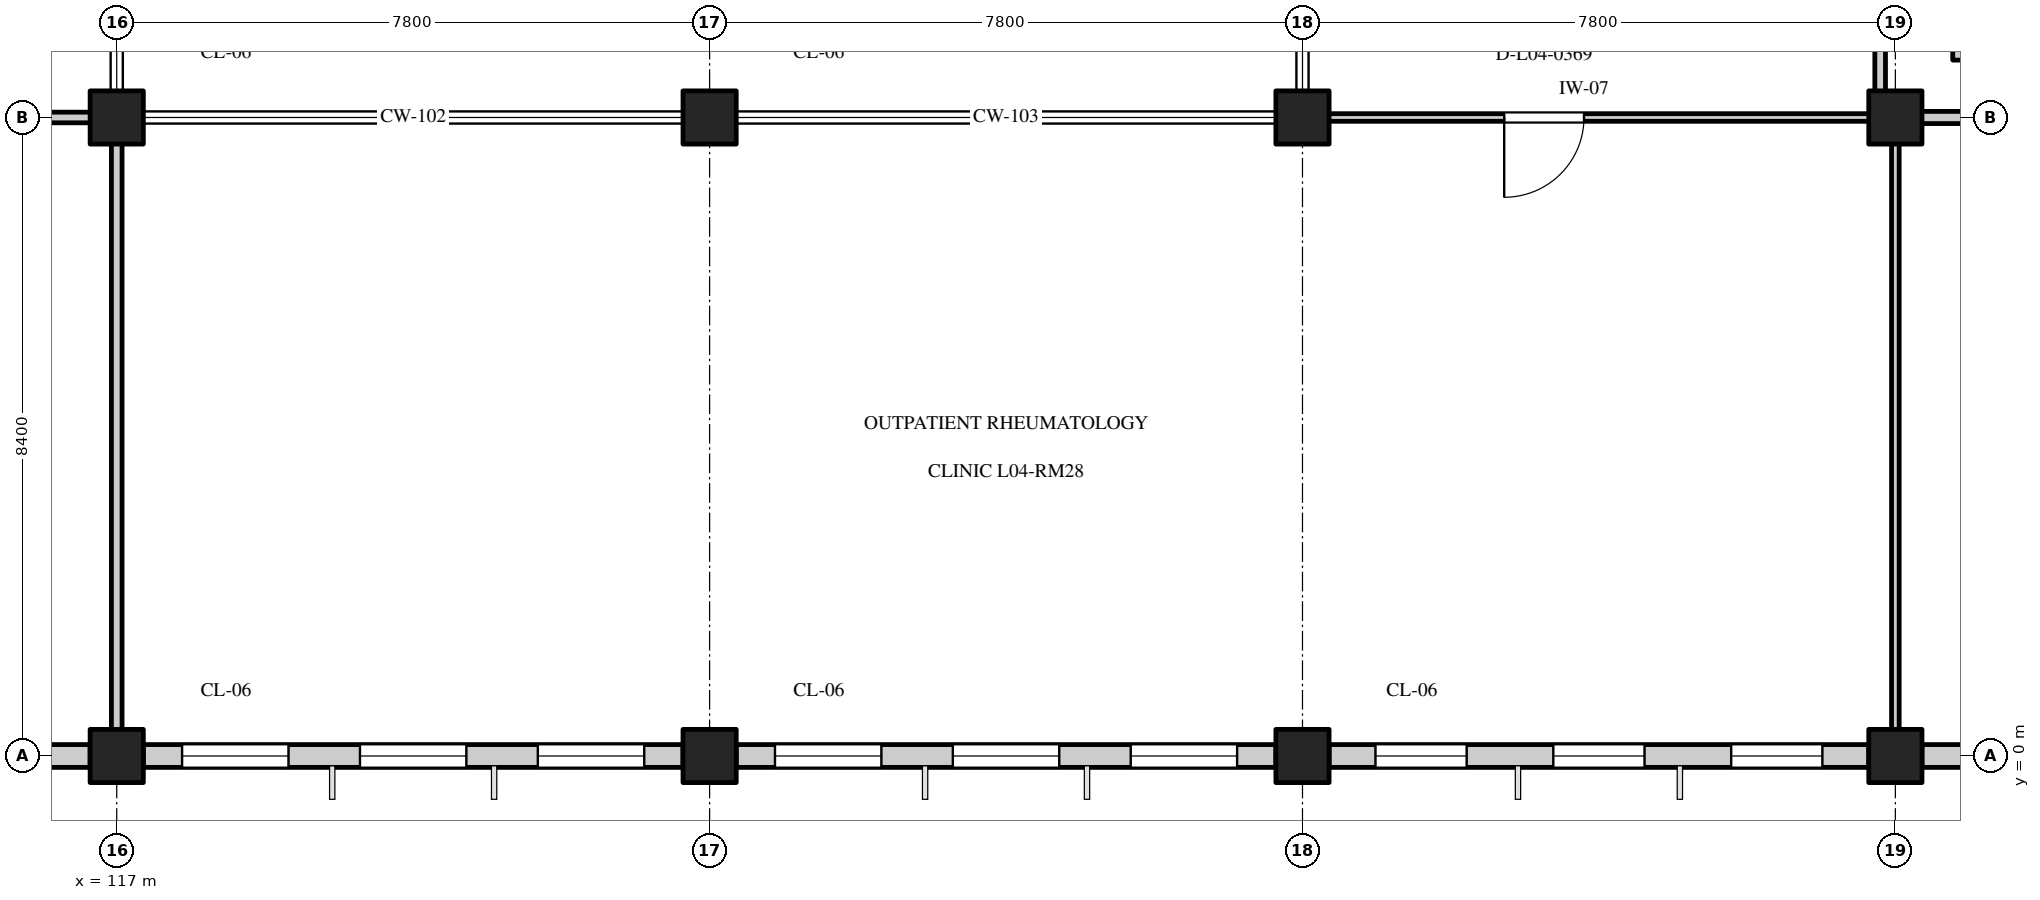
"""IFC4 building model, lengths in metres.
Left out: names, types, materials, properties, quantities, classifications, styles, units other than length and angle.
Written with IfcOpenShell. Run it as: python <this file> out.ifc"""

import sys

from ifc_helpers import new_model, si_unit, direction, frame, frame_2d, origin, origin_2d, place, context, subcontext, project, spatial, rectangle, extrude, element, fill, save


model = new_model("IFC4")
c1 = context("Model", 3, precision=1e-05, world=origin(), true_north=direction((0.0, 1.0)))
c2 = subcontext(c1, "Body", "Model", "MODEL_VIEW")
j1 = project(units=[si_unit("LENGTHUNIT", "METRE"), si_unit("PLANEANGLEUNIT", "RADIAN")], contexts=[c1])
p1 = place(None, origin())
s1 = spatial("IfcSite", under=j1, at=p1, CompositionType="ELEMENT")
p2 = place(p1, origin())
s2 = spatial("IfcBuilding", under=s1, at=p2, CompositionType="ELEMENT")
p3 = place(p2, frame((0.0, 0.0, 18.0)))
s3 = spatial("IfcBuildingStorey", under=s2, at=p3, CompositionType="ELEMENT", Elevation=18.0)
for number, where, z_axis, x_axis in (
    (1, (117.0, 0.0, 0.0), (0.0, 0.0, 1.0), (1.0, 0.0, 0.0)),
    (2, (117.0, 8.4, 0.0), (0.0, 0.0, 1.0), (1.0, 0.0, 0.0)),
    (3, (124.8, 0.0, 0.0), (0.0, 0.0, 1.0), (1.0, 0.0, 0.0)),
    (4, (124.8, 8.4, 0.0), (0.0, 0.0, 1.0), (1.0, 0.0, 0.0)),
    (5, (132.6, 0.0, 0.0), (0.0, 0.0, 1.0), (1.0, 0.0, 0.0)),
    (6, (132.6, 8.4, 0.0), (0.0, 0.0, 1.0), (1.0, 0.0, 0.0)),
    (7, (140.4, 0.0, 0.0), (0.0, 0.0, 1.0), (1.0, 0.0, 0.0)),
    (8, (140.4, 8.4, 0.0), (0.0, 0.0, 1.0), (1.0, 0.0, 0.0)),
):
    element("IfcColumn", number, at=place(p3, frame(where, z_axis=z_axis, x_axis=x_axis)), inside=s3, PredefinedType="COLUMN", context=c2, shape_type="SweptSolid", body=[
        extrude(rectangle(XDim=0.7, YDim=0.7, at=origin_2d()), origin(), (0.0, 0.0, 1.0), 4.2),
    ])
p4 = place(p3, frame((109.55, 0.0, 0.0), z_axis=(0.0, 0.0, 1.0), x_axis=(1.0, 0.0, 0.0)))
e9 = element("IfcWall", 9, at=p4, inside=s3, PredefinedType="STANDARD", context=c2, shape_type="SweptSolid", body=[
    extrude(rectangle(XDim=7.1, YDim=0.3, at=frame_2d((3.55, 0.0))), origin(), (0.0, 0.0, 1.0), 3.335),
])
p5 = place(p4, frame((0.61, 0.0, 0.8)))
e10 = element("IfcOpeningElement", 10, at=p5, cuts=e9, PredefinedType="OPENING", context=c2, shape_type="SweptSolid", body=[
    extrude(rectangle(XDim=1.2, YDim=1.4, at=frame_2d((0.6, 0.7))), frame((0.0, 0.162, 0.0), z_axis=(0.0, -1.0, 0.0), x_axis=(1.0, 0.0, 0.0)), (0.0, 0.0, 1.0), 0.324),
])
p6 = place(p4, frame((2.95, 0.0, 0.8)))
e11 = element("IfcOpeningElement", 11, at=p6, cuts=e9, PredefinedType="OPENING", context=c2, shape_type="SweptSolid", body=[
    extrude(rectangle(XDim=1.2, YDim=1.4, at=frame_2d((0.6, 0.7))), frame((0.0, 0.162, 0.0), z_axis=(0.0, -1.0, 0.0), x_axis=(1.0, 0.0, 0.0)), (0.0, 0.0, 1.0), 0.324),
])
p7 = place(p4, frame((5.29, 0.0, 0.8)))
e12 = element("IfcOpeningElement", 12, at=p7, cuts=e9, PredefinedType="OPENING", context=c2, shape_type="SweptSolid", body=[
    extrude(rectangle(XDim=1.2, YDim=1.4, at=frame_2d((0.6, 0.7))), frame((0.0, 0.162, 0.0), z_axis=(0.0, -1.0, 0.0), x_axis=(1.0, 0.0, 0.0)), (0.0, 0.0, 1.0), 0.324),
])
p8 = place(p3, frame((117.35, 0.0, 0.0), z_axis=(0.0, 0.0, 1.0), x_axis=(1.0, 0.0, 0.0)))
e13 = element("IfcWall", 13, at=p8, inside=s3, PredefinedType="STANDARD", context=c2, shape_type="SweptSolid", body=[
    extrude(rectangle(XDim=7.1, YDim=0.3, at=frame_2d((3.55, 0.0))), origin(), (0.0, 0.0, 1.0), 3.335),
])
p9 = place(p8, frame((0.51, 0.0, 0.8)))
e14 = element("IfcOpeningElement", 14, at=p9, cuts=e13, PredefinedType="OPENING", context=c2, shape_type="SweptSolid", body=[
    extrude(rectangle(XDim=1.4, YDim=1.6, at=frame_2d((0.7, 0.8))), frame((0.0, 0.162, 0.0), z_axis=(0.0, -1.0, 0.0), x_axis=(1.0, 0.0, 0.0)), (0.0, 0.0, 1.0), 0.324),
])
p10 = place(p8, frame((2.85, 0.0, 0.8)))
e15 = element("IfcOpeningElement", 15, at=p10, cuts=e13, PredefinedType="OPENING", context=c2, shape_type="SweptSolid", body=[
    extrude(rectangle(XDim=1.4, YDim=1.6, at=frame_2d((0.7, 0.8))), frame((0.0, 0.162, 0.0), z_axis=(0.0, -1.0, 0.0), x_axis=(1.0, 0.0, 0.0)), (0.0, 0.0, 1.0), 0.324),
])
p11 = place(p8, frame((5.19, 0.0, 0.8)))
e16 = element("IfcOpeningElement", 16, at=p11, cuts=e13, PredefinedType="OPENING", context=c2, shape_type="SweptSolid", body=[
    extrude(rectangle(XDim=1.4, YDim=1.6, at=frame_2d((0.7, 0.8))), frame((0.0, 0.162, 0.0), z_axis=(0.0, -1.0, 0.0), x_axis=(1.0, 0.0, 0.0)), (0.0, 0.0, 1.0), 0.324),
])
p12 = place(p3, frame((125.15, 0.0, 0.0), z_axis=(0.0, 0.0, 1.0), x_axis=(1.0, 0.0, 0.0)))
e17 = element("IfcWall", 17, at=p12, inside=s3, PredefinedType="STANDARD", context=c2, shape_type="SweptSolid", body=[
    extrude(rectangle(XDim=7.1, YDim=0.3, at=frame_2d((3.55, 0.0))), origin(), (0.0, 0.0, 1.0), 3.335),
])
p13 = place(p12, frame((0.51, 0.0, 0.8)))
e18 = element("IfcOpeningElement", 18, at=p13, cuts=e17, PredefinedType="OPENING", context=c2, shape_type="SweptSolid", body=[
    extrude(rectangle(XDim=1.4, YDim=1.45, at=frame_2d((0.7, 0.725))), frame((0.0, 0.162, 0.0), z_axis=(0.0, -1.0, 0.0), x_axis=(1.0, 0.0, 0.0)), (0.0, 0.0, 1.0), 0.324),
])
p14 = place(p12, frame((2.85, 0.0, 0.8)))
e19 = element("IfcOpeningElement", 19, at=p14, cuts=e17, PredefinedType="OPENING", context=c2, shape_type="SweptSolid", body=[
    extrude(rectangle(XDim=1.4, YDim=1.45, at=frame_2d((0.7, 0.725))), frame((0.0, 0.162, 0.0), z_axis=(0.0, -1.0, 0.0), x_axis=(1.0, 0.0, 0.0)), (0.0, 0.0, 1.0), 0.324),
])
p15 = place(p12, frame((5.19, 0.0, 0.8)))
e20 = element("IfcOpeningElement", 20, at=p15, cuts=e17, PredefinedType="OPENING", context=c2, shape_type="SweptSolid", body=[
    extrude(rectangle(XDim=1.4, YDim=1.45, at=frame_2d((0.7, 0.725))), frame((0.0, 0.162, 0.0), z_axis=(0.0, -1.0, 0.0), x_axis=(1.0, 0.0, 0.0)), (0.0, 0.0, 1.0), 0.324),
])
p16 = place(p3, frame((132.95, 0.0, 0.0), z_axis=(0.0, 0.0, 1.0), x_axis=(1.0, 0.0, 0.0)))
e21 = element("IfcWall", 21, at=p16, inside=s3, PredefinedType="STANDARD", context=c2, shape_type="SweptSolid", body=[
    extrude(rectangle(XDim=7.1, YDim=0.3, at=frame_2d((3.55, 0.0))), origin(), (0.0, 0.0, 1.0), 3.335),
])
p17 = place(p16, frame((0.61, 0.0, 0.8)))
e22 = element("IfcOpeningElement", 22, at=p17, cuts=e21, PredefinedType="OPENING", context=c2, shape_type="SweptSolid", body=[
    extrude(rectangle(XDim=1.2, YDim=1.55, at=frame_2d((0.6, 0.775))), frame((0.0, 0.162, 0.0), z_axis=(0.0, -1.0, 0.0), x_axis=(1.0, 0.0, 0.0)), (0.0, 0.0, 1.0), 0.324),
])
p18 = place(p16, frame((2.95, 0.0, 0.8)))
e23 = element("IfcOpeningElement", 23, at=p18, cuts=e21, PredefinedType="OPENING", context=c2, shape_type="SweptSolid", body=[
    extrude(rectangle(XDim=1.2, YDim=1.55, at=frame_2d((0.6, 0.775))), frame((0.0, 0.162, 0.0), z_axis=(0.0, -1.0, 0.0), x_axis=(1.0, 0.0, 0.0)), (0.0, 0.0, 1.0), 0.324),
])
p19 = place(p16, frame((5.29, 0.0, 0.8)))
e24 = element("IfcOpeningElement", 24, at=p19, cuts=e21, PredefinedType="OPENING", context=c2, shape_type="SweptSolid", body=[
    extrude(rectangle(XDim=1.2, YDim=1.55, at=frame_2d((0.6, 0.775))), frame((0.0, 0.162, 0.0), z_axis=(0.0, -1.0, 0.0), x_axis=(1.0, 0.0, 0.0)), (0.0, 0.0, 1.0), 0.324),
])
p20 = place(p3, frame((140.75, 0.0, 0.0), z_axis=(0.0, 0.0, 1.0), x_axis=(1.0, 0.0, 0.0)))
e25 = element("IfcWall", 25, at=p20, inside=s3, PredefinedType="STANDARD", context=c2, shape_type="SweptSolid", body=[
    extrude(rectangle(XDim=7.075, YDim=0.3, at=frame_2d((3.538, 0.0))), origin(), (0.0, 0.0, 1.0), 3.335),
])
p21 = place(p20, frame((0.61, 0.0, 0.8)))
e26 = element("IfcOpeningElement", 26, at=p21, cuts=e25, PredefinedType="OPENING", context=c2, shape_type="SweptSolid", body=[
    extrude(rectangle(XDim=1.2, YDim=1.4, at=frame_2d((0.6, 0.7))), frame((0.0, 0.162, 0.0), z_axis=(0.0, -1.0, 0.0), x_axis=(1.0, 0.0, 0.0)), (0.0, 0.0, 1.0), 0.324),
])
p22 = place(p20, frame((2.95, 0.0, 0.8)))
e27 = element("IfcOpeningElement", 27, at=p22, cuts=e25, PredefinedType="OPENING", context=c2, shape_type="SweptSolid", body=[
    extrude(rectangle(XDim=1.2, YDim=1.4, at=frame_2d((0.6, 0.7))), frame((0.0, 0.162, 0.0), z_axis=(0.0, -1.0, 0.0), x_axis=(1.0, 0.0, 0.0)), (0.0, 0.0, 1.0), 0.324),
])
p23 = place(p20, frame((5.29, 0.0, 0.8)))
e28 = element("IfcOpeningElement", 28, at=p23, cuts=e25, PredefinedType="OPENING", context=c2, shape_type="SweptSolid", body=[
    extrude(rectangle(XDim=1.2, YDim=1.4, at=frame_2d((0.6, 0.7))), frame((0.0, 0.162, 0.0), z_axis=(0.0, -1.0, 0.0), x_axis=(1.0, 0.0, 0.0)), (0.0, 0.0, 1.0), 0.324),
])
p24 = place(p3, frame((141.275, 9.155, 0.0), z_axis=(0.0, 0.0, 1.0), x_axis=(0.0, 1.0, 0.0)))
e29 = element("IfcWall", 29, at=p24, inside=s3, PredefinedType="STANDARD", context=c2, shape_type="SweptSolid", body=[
    extrude(rectangle(XDim=2.695, YDim=0.24, at=frame_2d((1.348, 0.0))), origin(), (0.0, 0.0, 1.0), 3.885),
])
p25 = place(p3, frame((101.485, 8.4, 0.0), z_axis=(0.0, 0.0, 1.0), x_axis=(1.0, 0.0, 0.0)))
e30 = element("IfcWall", 30, at=p25, inside=s3, PredefinedType="PARTITIONING", context=c2, shape_type="SweptSolid", body=[
    extrude(rectangle(XDim=15.43, YDim=0.14, at=frame_2d((7.715, 0.0))), origin(), (0.0, 0.0, 1.0), 3.865),
])
p26 = place(p25, frame((2.679, 0.0, 0.0)))
e31 = element("IfcOpeningElement", 31, at=p26, cuts=e30, PredefinedType="OPENING", context=c2, shape_type="SweptSolid", body=[
    extrude(rectangle(XDim=1.05, YDim=2.1, at=frame_2d((0.525, 1.05))), frame((0.0, 0.082, 0.0), z_axis=(0.0, -1.0, 0.0), x_axis=(1.0, 0.0, 0.0)), (0.0, 0.0, 1.0), 0.164),
])
p27 = place(p3, frame((117.0, 0.085, 0.0), z_axis=(0.0, 0.0, 1.0), x_axis=(0.0, 1.0, 0.0)))
e32 = element("IfcWall", 32, at=p27, inside=s3, PredefinedType="PARTITIONING", context=c2, shape_type="SweptSolid", body=[
    extrude(rectangle(XDim=8.23, YDim=0.14, at=frame_2d((4.115, 0.0))), origin(), (0.0, 0.0, 1.0), 3.235),
])
p28 = place(p3, frame((124.49, 8.4, 0.0), z_axis=(0.0, 0.0, 1.0), x_axis=(1.0, 0.0, 0.0)))
e33 = element("IfcWall", 33, at=p28, inside=s3, PredefinedType="PARTITIONING", context=c2, shape_type="SweptSolid", body=[
    extrude(rectangle(XDim=0.62, YDim=0.1, at=frame_2d((0.31, 0.0))), origin(), (0.0, 0.0, 1.0), 3.865),
])
p29 = place(p3, frame((132.29, 8.4, 0.0), z_axis=(0.0, 0.0, 1.0), x_axis=(1.0, 0.0, 0.0)))
e34 = element("IfcWall", 34, at=p29, inside=s3, PredefinedType="PARTITIONING", context=c2, shape_type="SweptSolid", body=[
    extrude(rectangle(XDim=8.025, YDim=0.1, at=frame_2d((4.012, 0.0))), origin(), (0.0, 0.0, 1.0), 3.865),
])
p30 = place(p29, frame((2.964, 0.0, 0.0)))
e35 = element("IfcOpeningElement", 35, at=p30, cuts=e34, PredefinedType="OPENING", context=c2, shape_type="SweptSolid", body=[
    extrude(rectangle(XDim=1.05, YDim=2.1, at=frame_2d((0.525, 1.05))), frame((0.0, 0.062, 0.0), z_axis=(0.0, -1.0, 0.0), x_axis=(1.0, 0.0, 0.0)), (0.0, 0.0, 1.0), 0.124),
])
p31 = place(p3, frame((124.49, 0.0, 0.0), z_axis=(0.0, 0.0, 1.0), x_axis=(1.0, 0.0, 0.0)))
e36 = element("IfcWall", 36, at=p31, inside=s3, PredefinedType="PARTITIONING", context=c2, shape_type="SweptSolid", body=[
    extrude(rectangle(XDim=0.62, YDim=0.1, at=frame_2d((0.31, 0.0))), origin(), (0.0, 0.0, 1.0), 3.235),
])
p32 = place(p3, frame((132.29, 0.0, 0.0), z_axis=(0.0, 0.0, 1.0), x_axis=(1.0, 0.0, 0.0)))
e37 = element("IfcWall", 37, at=p32, inside=s3, PredefinedType="PARTITIONING", context=c2, shape_type="SweptSolid", body=[
    extrude(rectangle(XDim=0.62, YDim=0.1, at=frame_2d((0.31, 0.0))), origin(), (0.0, 0.0, 1.0), 3.235),
])
p33 = place(p3, frame((140.4, 0.085, 0.0), z_axis=(0.0, 0.0, 1.0), x_axis=(0.0, 1.0, 0.0)))
e38 = element("IfcWall", 38, at=p33, inside=s3, PredefinedType="PARTITIONING", context=c2, shape_type="SweptSolid", body=[
    extrude(rectangle(XDim=8.23, YDim=0.1, at=frame_2d((4.115, 0.0))), origin(), (0.0, 0.0, 1.0), 3.865),
])
p34 = place(p3, frame((140.2, 8.485, 0.0), z_axis=(0.0, 0.0, 1.0), x_axis=(0.0, 1.0, 0.0)))
e39 = element("IfcWall", 39, at=p34, inside=s3, PredefinedType="PARTITIONING", context=c2, shape_type="SweptSolid", body=[
    extrude(rectangle(XDim=16.63, YDim=0.14, at=frame_2d((8.315, 0.0))), origin(), (0.0, 0.0, 1.0), 3.865),
])
p35 = place(p3, frame((140.485, 8.4, 0.0), z_axis=(0.0, 0.0, 1.0), x_axis=(1.0, 0.0, 0.0)))
e40 = element("IfcWall", 40, at=p35, inside=s3, PredefinedType="PARTITIONING", context=c2, shape_type="SweptSolid", body=[
    extrude(rectangle(XDim=7.43, YDim=0.16, at=frame_2d((3.715, 0.0))), origin(), (0.0, 0.0, 1.0), 3.865),
])
p36 = place(p35, frame((3.88, 0.0, 0.0)))
e41 = element("IfcOpeningElement", 41, at=p36, cuts=e40, PredefinedType="OPENING", context=c2, shape_type="SweptSolid", body=[
    extrude(rectangle(XDim=1.65, YDim=2.25, at=frame_2d((0.825, 1.125))), frame((0.0, 0.092, 0.0), z_axis=(0.0, -1.0, 0.0), x_axis=(1.0, 0.0, 0.0)), (0.0, 0.0, 1.0), 0.184),
])
p37 = place(p9, origin())
e42 = element("IfcWindow", 42, at=p37, inside=s3, PartitioningType="SINGLE_PANEL", PredefinedType="WINDOW", context=c2, shape_type="SweptSolid", body=[
    extrude(rectangle(XDim=1.4, YDim=1.6, at=frame_2d((0.7, 0.8))), frame((0.0, 0.03, 0.0), z_axis=(0.0, -1.0, 0.0), x_axis=(1.0, 0.0, 0.0)), (0.0, 0.0, 1.0), 0.06),
])
fill(e14, e42)
p38 = place(p10, origin())
e43 = element("IfcWindow", 43, at=p38, inside=s3, PartitioningType="SINGLE_PANEL", PredefinedType="WINDOW", context=c2, shape_type="SweptSolid", body=[
    extrude(rectangle(XDim=1.4, YDim=1.6, at=frame_2d((0.7, 0.8))), frame((0.0, 0.03, 0.0), z_axis=(0.0, -1.0, 0.0), x_axis=(1.0, 0.0, 0.0)), (0.0, 0.0, 1.0), 0.06),
])
fill(e15, e43)
p39 = place(p11, origin())
e44 = element("IfcWindow", 44, at=p39, inside=s3, PartitioningType="SINGLE_PANEL", PredefinedType="WINDOW", context=c2, shape_type="SweptSolid", body=[
    extrude(rectangle(XDim=1.4, YDim=1.6, at=frame_2d((0.7, 0.8))), frame((0.0, 0.03, 0.0), z_axis=(0.0, -1.0, 0.0), x_axis=(1.0, 0.0, 0.0)), (0.0, 0.0, 1.0), 0.06),
])
fill(e16, e44)
p40 = place(p13, origin())
e45 = element("IfcWindow", 45, at=p40, inside=s3, PartitioningType="SINGLE_PANEL", PredefinedType="WINDOW", context=c2, shape_type="SweptSolid", body=[
    extrude(rectangle(XDim=1.4, YDim=1.45, at=frame_2d((0.7, 0.725))), frame((0.0, 0.03, 0.0), z_axis=(0.0, -1.0, 0.0), x_axis=(1.0, 0.0, 0.0)), (0.0, 0.0, 1.0), 0.06),
])
fill(e18, e45)
p41 = place(p14, origin())
e46 = element("IfcWindow", 46, at=p41, inside=s3, PartitioningType="SINGLE_PANEL", PredefinedType="WINDOW", context=c2, shape_type="SweptSolid", body=[
    extrude(rectangle(XDim=1.4, YDim=1.45, at=frame_2d((0.7, 0.725))), frame((0.0, 0.03, 0.0), z_axis=(0.0, -1.0, 0.0), x_axis=(1.0, 0.0, 0.0)), (0.0, 0.0, 1.0), 0.06),
])
fill(e19, e46)
p42 = place(p15, origin())
e47 = element("IfcWindow", 47, at=p42, inside=s3, PartitioningType="SINGLE_PANEL", PredefinedType="WINDOW", context=c2, shape_type="SweptSolid", body=[
    extrude(rectangle(XDim=1.4, YDim=1.45, at=frame_2d((0.7, 0.725))), frame((0.0, 0.03, 0.0), z_axis=(0.0, -1.0, 0.0), x_axis=(1.0, 0.0, 0.0)), (0.0, 0.0, 1.0), 0.06),
])
fill(e20, e47)
p43 = place(p17, origin())
e48 = element("IfcWindow", 48, at=p43, inside=s3, PartitioningType="SINGLE_PANEL", PredefinedType="WINDOW", context=c2, shape_type="SweptSolid", body=[
    extrude(rectangle(XDim=1.2, YDim=1.55, at=frame_2d((0.6, 0.775))), frame((0.0, 0.03, 0.0), z_axis=(0.0, -1.0, 0.0), x_axis=(1.0, 0.0, 0.0)), (0.0, 0.0, 1.0), 0.06),
])
fill(e22, e48)
p44 = place(p18, origin())
e49 = element("IfcWindow", 49, at=p44, inside=s3, PartitioningType="SINGLE_PANEL", PredefinedType="WINDOW", context=c2, shape_type="SweptSolid", body=[
    extrude(rectangle(XDim=1.2, YDim=1.55, at=frame_2d((0.6, 0.775))), frame((0.0, 0.03, 0.0), z_axis=(0.0, -1.0, 0.0), x_axis=(1.0, 0.0, 0.0)), (0.0, 0.0, 1.0), 0.06),
])
fill(e23, e49)
p45 = place(p19, origin())
e50 = element("IfcWindow", 50, at=p45, inside=s3, PartitioningType="SINGLE_PANEL", PredefinedType="WINDOW", context=c2, shape_type="SweptSolid", body=[
    extrude(rectangle(XDim=1.2, YDim=1.55, at=frame_2d((0.6, 0.775))), frame((0.0, 0.03, 0.0), z_axis=(0.0, -1.0, 0.0), x_axis=(1.0, 0.0, 0.0)), (0.0, 0.0, 1.0), 0.06),
])
fill(e24, e50)
p46 = place(p30, frame((1.05, 0.0, 0.0), z_axis=(0.0, 0.0, 1.0), x_axis=(-1.0, 0.0, 0.0)))
e51 = element("IfcDoor", 51, at=p46, inside=s3, OperationType="SINGLE_SWING_RIGHT", PredefinedType="DOOR", context=c2, shape_type="SweptSolid", body=[
    extrude(rectangle(XDim=1.05, YDim=2.1, at=frame_2d((0.525, 1.05))), frame((0.0, 0.025, 0.0), z_axis=(0.0, -1.0, 0.0), x_axis=(1.0, 0.0, 0.0)), (0.0, 0.0, 1.0), 0.05),
])
fill(e35, e51)
save(model, sys.argv[1])
